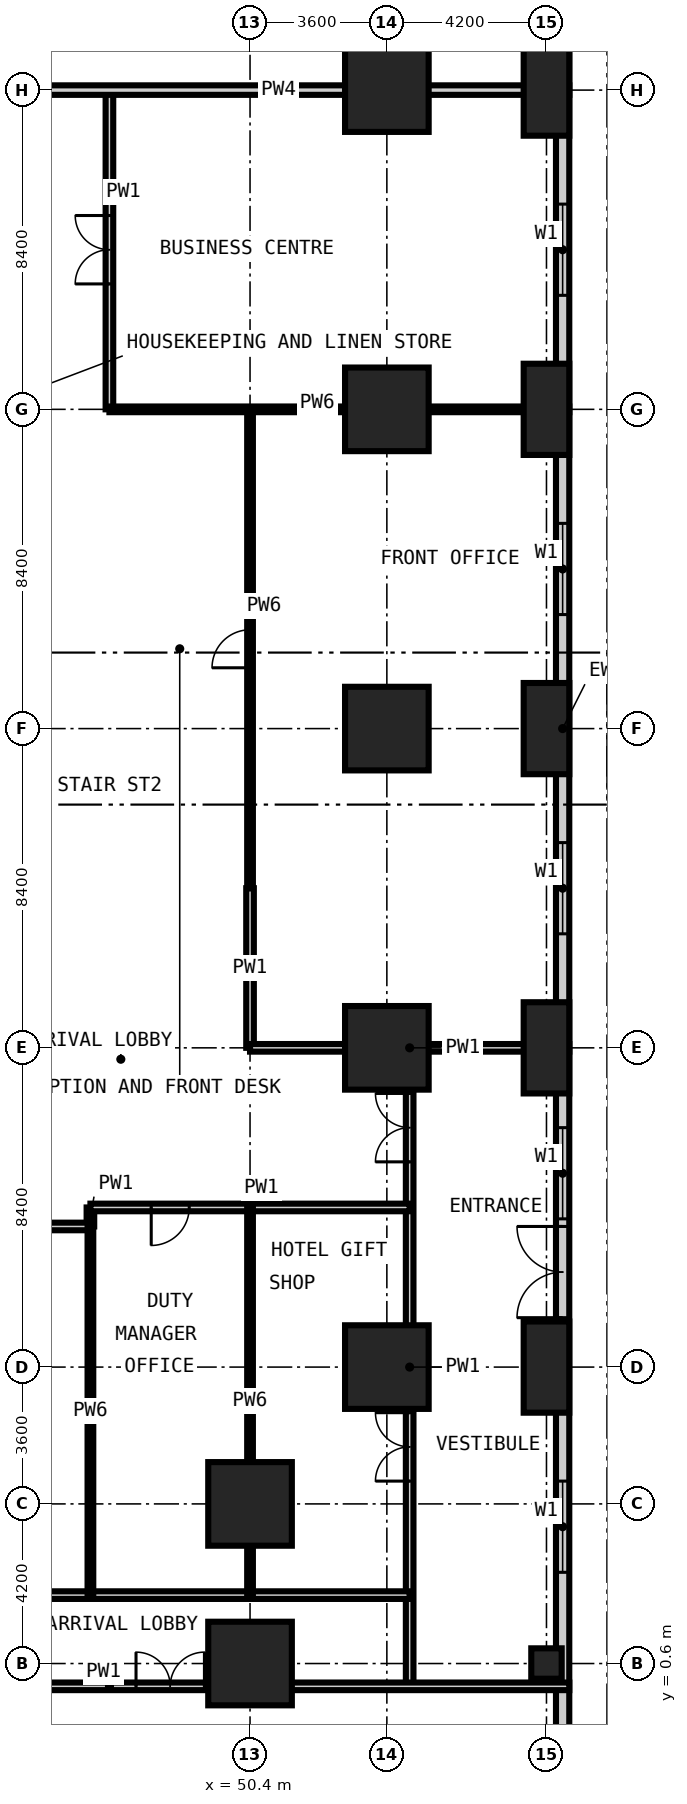
"""IFC4 building model, lengths in metres.
Left out: names, types, materials, properties, quantities, classifications, styles, units other than length and angle.
Written with IfcOpenShell. Run it as: python <this file> out.ifc"""

import sys

from ifc_helpers import new_model, si_unit, direction, frame, frame_2d, origin, origin_2d, place, context, subcontext, project, spatial, rectangle, extrude, element, fill, save


model = new_model("IFC4")
c1 = context("Model", 3, precision=1e-05, world=origin(), true_north=direction((0.0, 1.0)))
c2 = subcontext(c1, "Body", "Model", "MODEL_VIEW")
j1 = project(units=[si_unit("LENGTHUNIT", "METRE"), si_unit("PLANEANGLEUNIT", "RADIAN")], contexts=[c1])
p1 = place(None, origin())
s1 = spatial("IfcSite", under=j1, at=p1, CompositionType="ELEMENT")
p2 = place(p1, origin())
s2 = spatial("IfcBuilding", under=s1, at=p2, CompositionType="ELEMENT")
p3 = place(p2, origin())
s3 = spatial("IfcBuildingStorey", under=s2, at=p3, CompositionType="ELEMENT", Elevation=0.0)
for number, where, z_axis, x_axis in (
    (1, (50.4, 0.6, -0.3), (0.0, 0.0, 1.0), (1.0, 0.0, 0.0)),
    (2, (50.4, 4.8, -0.3), (0.0, 0.0, 1.0), (1.0, 0.0, 0.0)),
    (3, (54.0, 8.4, -0.3), (0.0, 0.0, 1.0), (1.0, 0.0, 0.0)),
    (4, (54.0, 16.8, -0.3), (0.0, 0.0, 1.0), (1.0, 0.0, 0.0)),
    (5, (54.0, 25.2, -0.3), (0.0, 0.0, 1.0), (1.0, 0.0, 0.0)),
    (6, (54.0, 33.6, -0.3), (0.0, 0.0, 1.0), (1.0, 0.0, 0.0)),
    (7, (54.0, 42.0, -0.3), (0.0, 0.0, 1.0), (1.0, 0.0, 0.0)),
):
    element("IfcColumn", number, at=place(p3, frame(where, z_axis=z_axis, x_axis=x_axis)), inside=s3, PredefinedType="COLUMN", context=c2, shape_type="SweptSolid", body=[
        extrude(rectangle(XDim=2.2, YDim=2.2, at=origin_2d()), origin(), (0.0, 0.0, 1.0), 6.0),
    ])
for number, where, z_axis, x_axis in (
    (8, (58.2, 8.4, -0.3), (0.0, 0.0, 1.0), (1.0, 0.0, 0.0)),
    (9, (58.2, 16.8, -0.3), (0.0, 0.0, 1.0), (1.0, 0.0, 0.0)),
    (10, (58.2, 25.2, -0.3), (0.0, 0.0, 1.0), (1.0, 0.0, 0.0)),
    (11, (58.2, 33.6, -0.3), (0.0, 0.0, 1.0), (1.0, 0.0, 0.0)),
    (12, (58.2, 42.0, -0.3), (0.0, 0.0, 1.0), (1.0, 0.0, 0.0)),
):
    element("IfcColumn", number, at=place(p3, frame(where, z_axis=z_axis, x_axis=x_axis)), inside=s3, PredefinedType="COLUMN", context=c2, shape_type="SweptSolid", body=[
        extrude(rectangle(XDim=1.2, YDim=2.4, at=origin_2d()), origin(), (0.0, 0.0, 1.0), 6.0),
    ])
p4 = place(p3, frame((58.2, 0.6, -0.3), z_axis=(0.0, 0.0, 1.0), x_axis=(1.0, 0.0, 0.0)))
e13 = element("IfcColumn", 13, at=p4, inside=s3, PredefinedType="COLUMN", context=c2, shape_type="SweptSolid", body=[
    extrude(rectangle(XDim=0.8, YDim=0.8, at=origin_2d()), origin(), (0.0, 0.0, 1.0), 6.0),
])
p5 = place(p3, frame((58.625, -8.4, 0.0), z_axis=(0.0, 0.0, 1.0), x_axis=(0.0, 1.0, 0.0)))
e14 = element("IfcWall", 14, at=p5, inside=s3, PredefinedType="SOLIDWALL", context=c2, shape_type="SweptSolid", body=[
    extrude(rectangle(XDim=67.2, YDim=0.35, at=frame_2d((33.6, 0.0))), origin(), (0.0, 0.0, 1.0), 5.7),
])
p6 = place(p5, frame((3.0, 0.0, 0.9)))
e15 = element("IfcOpeningElement", 15, at=p6, cuts=e14, PredefinedType="OPENING", context=c2, shape_type="SweptSolid", body=[
    extrude(rectangle(XDim=2.4, YDim=2.4, at=frame_2d((1.2, 1.2))), frame((0.0, 0.185, 0.0), z_axis=(0.0, -1.0, 0.0), x_axis=(1.0, 0.0, 0.0)), (0.0, 0.0, 1.0), 0.37),
])
p7 = place(p5, frame((18.1, 0.0, 0.0)))
e16 = element("IfcOpeningElement", 16, at=p7, cuts=e14, PredefinedType="OPENING", context=c2, shape_type="SweptSolid", body=[
    extrude(rectangle(XDim=2.4, YDim=3.0, at=frame_2d((1.2, 1.5))), frame((0.0, 0.185, 0.0), z_axis=(0.0, -1.0, 0.0), x_axis=(1.0, 0.0, 0.0)), (0.0, 0.0, 1.0), 0.37),
])
p8 = place(p5, frame((11.4, 0.0, 0.9)))
e17 = element("IfcOpeningElement", 17, at=p8, cuts=e14, PredefinedType="OPENING", context=c2, shape_type="SweptSolid", body=[
    extrude(rectangle(XDim=2.4, YDim=2.4, at=frame_2d((1.2, 1.2))), frame((0.0, 0.185, 0.0), z_axis=(0.0, -1.0, 0.0), x_axis=(1.0, 0.0, 0.0)), (0.0, 0.0, 1.0), 0.37),
])
p9 = place(p5, frame((20.7, 0.0, 0.9)))
e18 = element("IfcOpeningElement", 18, at=p9, cuts=e14, PredefinedType="OPENING", context=c2, shape_type="SweptSolid", body=[
    extrude(rectangle(XDim=2.4, YDim=2.4, at=frame_2d((1.2, 1.2))), frame((0.0, 0.185, 0.0), z_axis=(0.0, -1.0, 0.0), x_axis=(1.0, 0.0, 0.0)), (0.0, 0.0, 1.0), 0.37),
])
p10 = place(p5, frame((28.2, 0.0, 0.9)))
e19 = element("IfcOpeningElement", 19, at=p10, cuts=e14, PredefinedType="OPENING", context=c2, shape_type="SweptSolid", body=[
    extrude(rectangle(XDim=2.4, YDim=2.4, at=frame_2d((1.2, 1.2))), frame((0.0, 0.185, 0.0), z_axis=(0.0, -1.0, 0.0), x_axis=(1.0, 0.0, 0.0)), (0.0, 0.0, 1.0), 0.37),
])
p11 = place(p5, frame((36.6, 0.0, 0.9)))
e20 = element("IfcOpeningElement", 20, at=p11, cuts=e14, PredefinedType="OPENING", context=c2, shape_type="SweptSolid", body=[
    extrude(rectangle(XDim=2.4, YDim=2.4, at=frame_2d((1.2, 1.2))), frame((0.0, 0.185, 0.0), z_axis=(0.0, -1.0, 0.0), x_axis=(1.0, 0.0, 0.0)), (0.0, 0.0, 1.0), 0.37),
])
p12 = place(p5, frame((45.0, 0.0, 0.9)))
e21 = element("IfcOpeningElement", 21, at=p12, cuts=e14, PredefinedType="OPENING", context=c2, shape_type="SweptSolid", body=[
    extrude(rectangle(XDim=2.4, YDim=2.4, at=frame_2d((1.2, 1.2))), frame((0.0, 0.185, 0.0), z_axis=(0.0, -1.0, 0.0), x_axis=(1.0, 0.0, 0.0)), (0.0, 0.0, 1.0), 0.37),
])
p13 = place(p5, frame((60.1, 0.0, 0.0)))
e22 = element("IfcOpeningElement", 22, at=p13, cuts=e14, PredefinedType="OPENING", context=c2, shape_type="SweptSolid", body=[
    extrude(rectangle(XDim=3.6, YDim=4.5, at=frame_2d((1.8, 2.25))), frame((0.0, 0.185, 0.0), z_axis=(0.0, -1.0, 0.0), x_axis=(1.0, 0.0, 0.0)), (0.0, 0.0, 1.0), 0.37),
])
p14 = place(p5, frame((53.4, 0.0, 0.9)))
e23 = element("IfcOpeningElement", 23, at=p14, cuts=e14, PredefinedType="OPENING", context=c2, shape_type="SweptSolid", body=[
    extrude(rectangle(XDim=2.4, YDim=2.4, at=frame_2d((1.2, 1.2))), frame((0.0, 0.185, 0.0), z_axis=(0.0, -1.0, 0.0), x_axis=(1.0, 0.0, 0.0)), (0.0, 0.0, 1.0), 0.37),
])
p15 = place(p3, frame((46.2, 12.1, 0.0), z_axis=(0.0, 0.0, 1.0), x_axis=(0.0, 1.0, 0.0)))
e24 = element("IfcWall", 24, at=p15, inside=s3, PredefinedType="PARTITIONING", context=c2, shape_type="SweptSolid", body=[
    extrude(rectangle(XDim=0.5, YDim=0.2, at=frame_2d((0.25, 0.0))), origin(), (0.0, 0.0, 1.0), 5.7),
])
p16 = place(p3, frame((46.7, 33.6, 0.0), z_axis=(0.0, 0.0, 1.0), x_axis=(0.0, 1.0, 0.0)))
e25 = element("IfcWall", 25, at=p16, inside=s3, PredefinedType="PARTITIONING", context=c2, shape_type="SweptSolid", body=[
    extrude(rectangle(XDim=8.4, YDim=0.2, at=frame_2d((4.2, 0.0))), origin(), (0.0, 0.0, 1.0), 5.7),
])
p17 = place(p16, frame((3.3, 0.0, 0.0)))
e26 = element("IfcOpeningElement", 26, at=p17, cuts=e25, PredefinedType="OPENING", context=c2, shape_type="SweptSolid", body=[
    extrude(rectangle(XDim=1.8, YDim=2.4, at=frame_2d((0.9, 1.2))), frame((0.0, 0.11, 0.0), z_axis=(0.0, -1.0, 0.0), x_axis=(1.0, 0.0, 0.0)), (0.0, 0.0, 1.0), 0.22),
])
p18 = place(p3, frame((50.4, 16.8, 0.0), z_axis=(0.0, 0.0, 1.0), x_axis=(0.0, 1.0, 0.0)))
e27 = element("IfcWall", 27, at=p18, inside=s3, PredefinedType="PARTITIONING", context=c2, shape_type="SweptSolid", body=[
    extrude(rectangle(XDim=4.2, YDim=0.2, at=frame_2d((2.1, 0.0))), origin(), (0.0, 0.0, 1.0), 5.7),
])
p19 = place(p3, frame((54.6, 0.0, 0.0), z_axis=(0.0, 0.0, 1.0), x_axis=(0.0, 1.0, 0.0)))
e28 = element("IfcWall", 28, at=p19, inside=s3, PredefinedType="PARTITIONING", context=c2, shape_type="SweptSolid", body=[
    extrude(rectangle(XDim=16.8, YDim=0.2, at=frame_2d((8.4, 0.0))), origin(), (0.0, 0.0, 1.0), 5.7),
])
p20 = place(p19, frame((13.8, 0.0, 0.0)))
e29 = element("IfcOpeningElement", 29, at=p20, cuts=e28, PredefinedType="OPENING", context=c2, shape_type="SweptSolid", body=[
    extrude(rectangle(XDim=1.8, YDim=2.4, at=frame_2d((0.9, 1.2))), frame((0.0, 0.11, 0.0), z_axis=(0.0, -1.0, 0.0), x_axis=(1.0, 0.0, 0.0)), (0.0, 0.0, 1.0), 0.22),
])
p21 = place(p19, frame((5.4, 0.0, 0.0)))
e30 = element("IfcOpeningElement", 30, at=p21, cuts=e28, PredefinedType="OPENING", context=c2, shape_type="SweptSolid", body=[
    extrude(rectangle(XDim=1.8, YDim=2.4, at=frame_2d((0.9, 1.2))), frame((0.0, 0.11, 0.0), z_axis=(0.0, -1.0, 0.0), x_axis=(1.0, 0.0, 0.0)), (0.0, 0.0, 1.0), 0.22),
])
p22 = place(p3, frame((37.8, 0.0, 0.0), z_axis=(0.0, 0.0, 1.0), x_axis=(1.0, 0.0, 0.0)))
e31 = element("IfcWall", 31, at=p22, inside=s3, PredefinedType="PARTITIONING", context=c2, shape_type="SweptSolid", body=[
    extrude(rectangle(XDim=21.0, YDim=0.2, at=frame_2d((10.5, 0.0))), origin(), (0.0, 0.0, 1.0), 5.7),
])
p23 = place(p22, frame((9.6, 0.0, 0.0)))
e32 = element("IfcOpeningElement", 32, at=p23, cuts=e31, PredefinedType="OPENING", context=c2, shape_type="SweptSolid", body=[
    extrude(rectangle(XDim=1.8, YDim=2.4, at=frame_2d((0.9, 1.2))), frame((0.0, 0.11, 0.0), z_axis=(0.0, -1.0, 0.0), x_axis=(1.0, 0.0, 0.0)), (0.0, 0.0, 1.0), 0.22),
])
p24 = place(p3, frame((0.0, 2.4, 0.0), z_axis=(0.0, 0.0, 1.0), x_axis=(1.0, 0.0, 0.0)))
e33 = element("IfcWall", 33, at=p24, inside=s3, PredefinedType="PARTITIONING", context=c2, shape_type="SweptSolid", body=[
    extrude(rectangle(XDim=54.6, YDim=0.2, at=frame_2d((27.3, 0.0))), origin(), (0.0, 0.0, 1.0), 5.7),
])
p25 = place(p24, frame((5.8, 0.0, 0.0)))
e34 = element("IfcOpeningElement", 34, at=p25, cuts=e33, PredefinedType="OPENING", context=c2, shape_type="SweptSolid", body=[
    extrude(rectangle(XDim=1.0, YDim=2.1, at=frame_2d((0.5, 1.05))), frame((0.0, 0.11, 0.0), z_axis=(0.0, -1.0, 0.0), x_axis=(1.0, 0.0, 0.0)), (0.0, 0.0, 1.0), 0.22),
])
p26 = place(p24, frame((18.4, 0.0, 0.0)))
e35 = element("IfcOpeningElement", 35, at=p26, cuts=e33, PredefinedType="OPENING", context=c2, shape_type="SweptSolid", body=[
    extrude(rectangle(XDim=1.0, YDim=2.1, at=frame_2d((0.5, 1.05))), frame((0.0, 0.11, 0.0), z_axis=(0.0, -1.0, 0.0), x_axis=(1.0, 0.0, 0.0)), (0.0, 0.0, 1.0), 0.22),
])
p27 = place(p24, frame((28.9, 0.0, 0.0)))
e36 = element("IfcOpeningElement", 36, at=p27, cuts=e33, PredefinedType="OPENING", context=c2, shape_type="SweptSolid", body=[
    extrude(rectangle(XDim=1.0, YDim=2.1, at=frame_2d((0.5, 1.05))), frame((0.0, 0.11, 0.0), z_axis=(0.0, -1.0, 0.0), x_axis=(1.0, 0.0, 0.0)), (0.0, 0.0, 1.0), 0.22),
])
p28 = place(p24, frame((37.3, 0.0, 0.0)))
e37 = element("IfcOpeningElement", 37, at=p28, cuts=e33, PredefinedType="OPENING", context=c2, shape_type="SweptSolid", body=[
    extrude(rectangle(XDim=1.0, YDim=2.1, at=frame_2d((0.5, 1.05))), frame((0.0, 0.11, 0.0), z_axis=(0.0, -1.0, 0.0), x_axis=(1.0, 0.0, 0.0)), (0.0, 0.0, 1.0), 0.22),
])
p29 = place(p3, frame((12.6, 12.1, 0.0), z_axis=(0.0, 0.0, 1.0), x_axis=(1.0, 0.0, 0.0)))
e38 = element("IfcWall", 38, at=p29, inside=s3, PredefinedType="PARTITIONING", context=c2, shape_type="SweptSolid", body=[
    extrude(rectangle(XDim=33.6, YDim=0.2, at=frame_2d((16.8, 0.0))), origin(), (0.0, 0.0, 1.0), 5.7),
])
p30 = place(p3, frame((46.2, 12.6, 0.0), z_axis=(0.0, 0.0, 1.0), x_axis=(1.0, 0.0, 0.0)))
e39 = element("IfcWall", 39, at=p30, inside=s3, PredefinedType="PARTITIONING", context=c2, shape_type="SweptSolid", body=[
    extrude(rectangle(XDim=8.4, YDim=0.2, at=frame_2d((4.2, 0.0))), origin(), (0.0, 0.0, 1.0), 5.7),
])
p31 = place(p30, frame((1.6, 0.0, 0.0)))
e40 = element("IfcOpeningElement", 40, at=p31, cuts=e39, PredefinedType="OPENING", context=c2, shape_type="SweptSolid", body=[
    extrude(rectangle(XDim=1.0, YDim=2.1, at=frame_2d((0.5, 1.05))), frame((0.0, 0.11, 0.0), z_axis=(0.0, -1.0, 0.0), x_axis=(1.0, 0.0, 0.0)), (0.0, 0.0, 1.0), 0.22),
])
p32 = place(p3, frame((50.4, 16.8, 0.0), z_axis=(0.0, 0.0, 1.0), x_axis=(1.0, 0.0, 0.0)))
e41 = element("IfcWall", 41, at=p32, inside=s3, PredefinedType="PARTITIONING", context=c2, shape_type="SweptSolid", body=[
    extrude(rectangle(XDim=8.4, YDim=0.2, at=frame_2d((4.2, 0.0))), origin(), (0.0, 0.0, 1.0), 5.7),
])
p33 = place(p3, frame((43.5, 42.0, 0.0), z_axis=(0.0, 0.0, 1.0), x_axis=(1.0, 0.0, 0.0)))
e42 = element("IfcWall", 42, at=p33, inside=s3, PredefinedType="PARTITIONING", context=c2, shape_type="SweptSolid", body=[
    extrude(rectangle(XDim=15.3, YDim=0.25, at=frame_2d((7.65, 0.0))), origin(), (0.0, 0.0, 1.0), 5.7),
])
p34 = place(p3, frame((46.2, 2.4, 0.0), z_axis=(0.0, 0.0, 1.0), x_axis=(0.0, 1.0, 0.0)))
e43 = element("IfcWall", 43, at=p34, inside=s3, PredefinedType="PARTITIONING", context=c2, shape_type="SweptSolid", body=[
    extrude(rectangle(XDim=9.7, YDim=0.15, at=frame_2d((4.85, 0.0))), origin(), (0.0, 0.0, 1.0), 5.7),
])
p35 = place(p3, frame((50.4, 2.4, 0.0), z_axis=(0.0, 0.0, 1.0), x_axis=(0.0, 1.0, 0.0)))
e44 = element("IfcWall", 44, at=p35, inside=s3, PredefinedType="PARTITIONING", context=c2, shape_type="SweptSolid", body=[
    extrude(rectangle(XDim=10.2, YDim=0.15, at=frame_2d((5.1, 0.0))), origin(), (0.0, 0.0, 1.0), 5.7),
])
p36 = place(p3, frame((50.4, 21.0, 0.0), z_axis=(0.0, 0.0, 1.0), x_axis=(0.0, 1.0, 0.0)))
e45 = element("IfcWall", 45, at=p36, inside=s3, PredefinedType="PARTITIONING", context=c2, shape_type="SweptSolid", body=[
    extrude(rectangle(XDim=12.6, YDim=0.15, at=frame_2d((6.3, 0.0))), origin(), (0.0, 0.0, 1.0), 5.7),
])
p37 = place(p36, frame((5.8, 0.0, 0.0)))
e46 = element("IfcOpeningElement", 46, at=p37, cuts=e45, PredefinedType="OPENING", context=c2, shape_type="SweptSolid", body=[
    extrude(rectangle(XDim=1.0, YDim=2.1, at=frame_2d((0.5, 1.05))), frame((0.0, 0.085, 0.0), z_axis=(0.0, -1.0, 0.0), x_axis=(1.0, 0.0, 0.0)), (0.0, 0.0, 1.0), 0.17),
])
p38 = place(p3, frame((46.7, 33.6, 0.0), z_axis=(0.0, 0.0, 1.0), x_axis=(1.0, 0.0, 0.0)))
e47 = element("IfcWall", 47, at=p38, inside=s3, PredefinedType="PARTITIONING", context=c2, shape_type="SweptSolid", body=[
    extrude(rectangle(XDim=12.1, YDim=0.15, at=frame_2d((6.05, 0.0))), origin(), (0.0, 0.0, 1.0), 5.7),
])
p39 = place(p7, origin())
e48 = element("IfcDoor", 48, at=p39, inside=s3, OperationType="DOUBLE_DOOR_DOUBLE_SWING", PredefinedType="DOOR", context=c2, shape_type="SweptSolid", body=[
    extrude(rectangle(XDim=2.4, YDim=3.0, at=frame_2d((1.2, 1.5))), frame((0.0, 0.025, 0.0), z_axis=(0.0, -1.0, 0.0), x_axis=(1.0, 0.0, 0.0)), (0.0, 0.0, 1.0), 0.05),
])
fill(e16, e48)
p40 = place(p8, origin())
e49 = element("IfcWindow", 49, at=p40, inside=s3, PartitioningType="SINGLE_PANEL", PredefinedType="WINDOW", context=c2, shape_type="SweptSolid", body=[
    extrude(rectangle(XDim=2.4, YDim=2.4, at=frame_2d((1.2, 1.2))), frame((0.0, 0.03, 0.0), z_axis=(0.0, -1.0, 0.0), x_axis=(1.0, 0.0, 0.0)), (0.0, 0.0, 1.0), 0.06),
])
fill(e17, e49)
p41 = place(p9, origin())
e50 = element("IfcWindow", 50, at=p41, inside=s3, PartitioningType="SINGLE_PANEL", PredefinedType="WINDOW", context=c2, shape_type="SweptSolid", body=[
    extrude(rectangle(XDim=2.4, YDim=2.4, at=frame_2d((1.2, 1.2))), frame((0.0, 0.03, 0.0), z_axis=(0.0, -1.0, 0.0), x_axis=(1.0, 0.0, 0.0)), (0.0, 0.0, 1.0), 0.06),
])
fill(e18, e50)
p42 = place(p10, origin())
e51 = element("IfcWindow", 51, at=p42, inside=s3, PartitioningType="SINGLE_PANEL", PredefinedType="WINDOW", context=c2, shape_type="SweptSolid", body=[
    extrude(rectangle(XDim=2.4, YDim=2.4, at=frame_2d((1.2, 1.2))), frame((0.0, 0.03, 0.0), z_axis=(0.0, -1.0, 0.0), x_axis=(1.0, 0.0, 0.0)), (0.0, 0.0, 1.0), 0.06),
])
fill(e19, e51)
p43 = place(p11, origin())
e52 = element("IfcWindow", 52, at=p43, inside=s3, PartitioningType="SINGLE_PANEL", PredefinedType="WINDOW", context=c2, shape_type="SweptSolid", body=[
    extrude(rectangle(XDim=2.4, YDim=2.4, at=frame_2d((1.2, 1.2))), frame((0.0, 0.03, 0.0), z_axis=(0.0, -1.0, 0.0), x_axis=(1.0, 0.0, 0.0)), (0.0, 0.0, 1.0), 0.06),
])
fill(e20, e52)
p44 = place(p12, origin())
e53 = element("IfcWindow", 53, at=p44, inside=s3, PartitioningType="SINGLE_PANEL", PredefinedType="WINDOW", context=c2, shape_type="SweptSolid", body=[
    extrude(rectangle(XDim=2.4, YDim=2.4, at=frame_2d((1.2, 1.2))), frame((0.0, 0.03, 0.0), z_axis=(0.0, -1.0, 0.0), x_axis=(1.0, 0.0, 0.0)), (0.0, 0.0, 1.0), 0.06),
])
fill(e21, e53)
p45 = place(p20, origin())
e54 = element("IfcDoor", 54, at=p45, inside=s3, OperationType="DOUBLE_DOOR_DOUBLE_SWING", PredefinedType="DOOR", context=c2, shape_type="SweptSolid", body=[
    extrude(rectangle(XDim=1.8, YDim=2.4, at=frame_2d((0.9, 1.2))), frame((0.0, 0.025, 0.0), z_axis=(0.0, -1.0, 0.0), x_axis=(1.0, 0.0, 0.0)), (0.0, 0.0, 1.0), 0.05),
])
fill(e29, e54)
p46 = place(p37, origin())
e55 = element("IfcDoor", 55, at=p46, inside=s3, OperationType="SINGLE_SWING_LEFT", PredefinedType="DOOR", context=c2, shape_type="SweptSolid", body=[
    extrude(rectangle(XDim=1.0, YDim=2.1, at=frame_2d((0.5, 1.05))), frame((0.0, 0.025, 0.0), z_axis=(0.0, -1.0, 0.0), x_axis=(1.0, 0.0, 0.0)), (0.0, 0.0, 1.0), 0.05),
])
fill(e46, e55)
p47 = place(p17, origin())
e56 = element("IfcDoor", 56, at=p47, inside=s3, OperationType="DOUBLE_DOOR_DOUBLE_SWING", PredefinedType="DOOR", context=c2, shape_type="SweptSolid", body=[
    extrude(rectangle(XDim=1.8, YDim=2.4, at=frame_2d((0.9, 1.2))), frame((0.0, 0.025, 0.0), z_axis=(0.0, -1.0, 0.0), x_axis=(1.0, 0.0, 0.0)), (0.0, 0.0, 1.0), 0.05),
])
fill(e26, e56)
p48 = place(p23, origin())
e57 = element("IfcDoor", 57, at=p48, inside=s3, OperationType="DOUBLE_DOOR_DOUBLE_SWING", PredefinedType="DOOR", context=c2, shape_type="SweptSolid", body=[
    extrude(rectangle(XDim=1.8, YDim=2.4, at=frame_2d((0.9, 1.2))), frame((0.0, 0.025, 0.0), z_axis=(0.0, -1.0, 0.0), x_axis=(1.0, 0.0, 0.0)), (0.0, 0.0, 1.0), 0.05),
])
fill(e32, e57)
p49 = place(p31, frame((1.0, 0.0, 0.0), z_axis=(0.0, 0.0, 1.0), x_axis=(-1.0, 0.0, 0.0)))
e58 = element("IfcDoor", 58, at=p49, inside=s3, OperationType="SINGLE_SWING_RIGHT", PredefinedType="DOOR", context=c2, shape_type="SweptSolid", body=[
    extrude(rectangle(XDim=1.0, YDim=2.1, at=frame_2d((0.5, 1.05))), frame((0.0, 0.025, 0.0), z_axis=(0.0, -1.0, 0.0), x_axis=(1.0, 0.0, 0.0)), (0.0, 0.0, 1.0), 0.05),
])
fill(e40, e58)
p50 = place(p21, origin())
e59 = element("IfcDoor", 59, at=p50, inside=s3, OperationType="DOUBLE_DOOR_DOUBLE_SWING", PredefinedType="DOOR", context=c2, shape_type="SweptSolid", body=[
    extrude(rectangle(XDim=1.8, YDim=2.4, at=frame_2d((0.9, 1.2))), frame((0.0, 0.025, 0.0), z_axis=(0.0, -1.0, 0.0), x_axis=(1.0, 0.0, 0.0)), (0.0, 0.0, 1.0), 0.05),
])
fill(e30, e59)
save(model, sys.argv[1])
